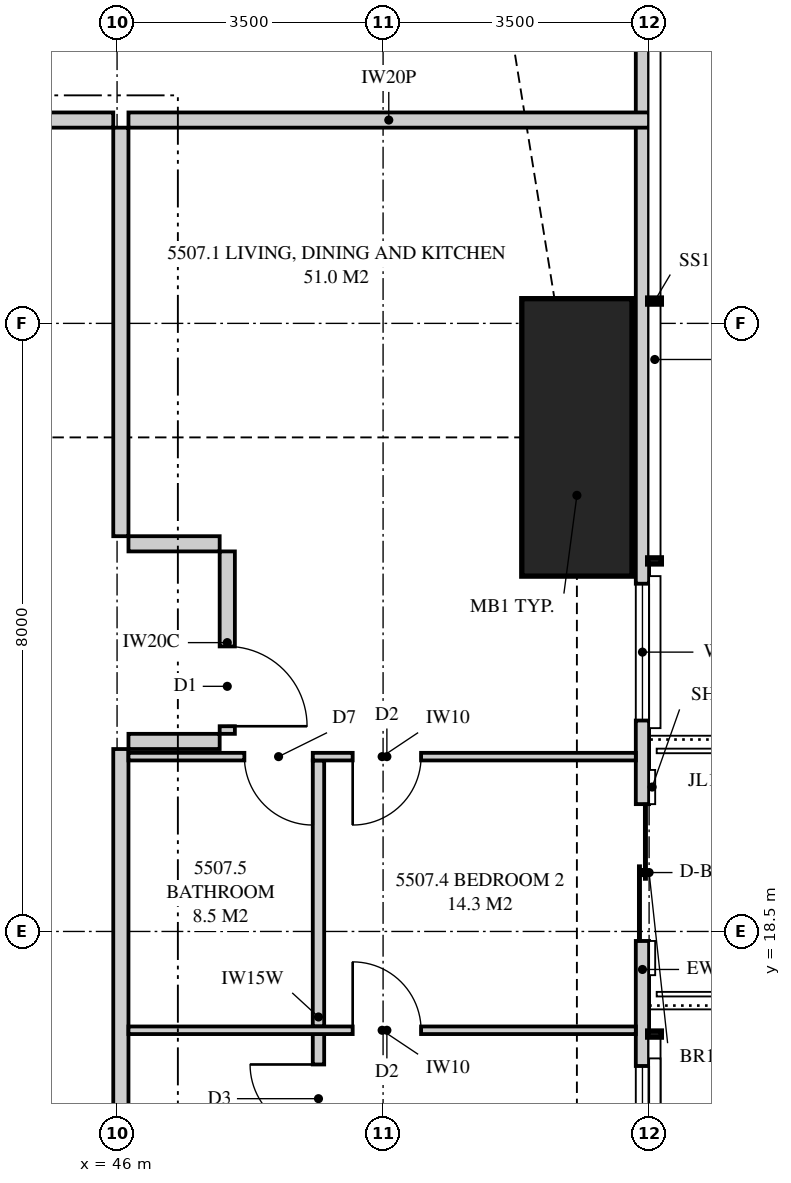
"""IFC4 building model, lengths in metres.
Left out: names, types, materials, properties, quantities, classifications, styles, units other than length and angle.
Written with IfcOpenShell. Run it as: python <this file> out.ifc"""

import sys

from ifc_helpers import new_model, si_unit, direction, frame, frame_2d, origin, origin_2d, place, context, subcontext, project, spatial, polyline, rectangle, outline, extrude, element, fill, save


model = new_model("IFC4")
c1 = context("Model", 3, precision=1e-05, world=origin(), true_north=direction((0.0, 1.0)))
c2 = subcontext(c1, "Body", "Model", "MODEL_VIEW")
j1 = project(units=[si_unit("LENGTHUNIT", "METRE"), si_unit("PLANEANGLEUNIT", "RADIAN")], contexts=[c1])
p1 = place(None, origin())
s1 = spatial("IfcSite", under=j1, at=p1, CompositionType="ELEMENT")
p2 = place(p1, origin())
s2 = spatial("IfcBuilding", under=s1, at=p2, CompositionType="ELEMENT")
p3 = place(p2, frame((0.0, 0.0, 201.25)))
s3 = spatial("IfcBuildingStorey", under=s2, at=p3, CompositionType="ELEMENT", Elevation=201.25)
p4 = place(p3, frame((52.05, 25.0, 0.0), z_axis=(0.0, 0.0, 1.0), x_axis=(1.0, 0.0, 0.0)))
e1 = element("IfcColumn", 1, at=p4, inside=s3, PredefinedType="COLUMN", context=c2, shape_type="SweptSolid", body=[
    extrude(rectangle(XDim=1.45, YDim=3.65, at=origin_2d()), origin(), (0.0, 0.0, 1.0), 3.35),
])
p5 = place(p3, frame((52.913, 3.051, 0.0), z_axis=(0.0, 0.0, 1.0), x_axis=(0.0, 1.0, 0.0)))
e2 = element("IfcWall", 2, at=p5, inside=s3, PredefinedType="SOLIDWALL", context=c2, shape_type="SweptSolid", body=[
    extrude(outline(polyline([(0.0, 0.0), (29.897, 0.0), (29.897, 3.11), (22.167, 3.11), (22.167, 2.15), (22.074, 2.15), (22.074, 3.11), (21.949, 3.11), (21.949, 2.15), (9.949, 2.15), (9.949, 3.11), (9.847, 3.11), (9.847, 2.15), (9.706, 2.15), (9.706, 3.11), (0.0, 3.11), (0.0, 0.0)])), frame((0.0, 0.087, 0.0), z_axis=(0.0, -1.0, 0.0), x_axis=(1.0, 0.0, 0.0)), (0.0, 0.0, 1.0), 0.175),
])
p6 = place(p5, frame((1.137, 0.0, 0.4)))
e3 = element("IfcOpeningElement", 3, at=p6, cuts=e2, PredefinedType="OPENING", context=c2, shape_type="SweptSolid", body=[
    extrude(rectangle(XDim=2.4, YDim=1.7, at=frame_2d((1.2, 0.85))), frame((0.0, 0.097, 0.0), z_axis=(0.0, -1.0, 0.0), x_axis=(1.0, 0.0, 0.0)), (0.0, 0.0, 1.0), 0.195),
])
p7 = place(p5, frame((5.571, 0.0, 0.4)))
e4 = element("IfcOpeningElement", 4, at=p7, cuts=e2, PredefinedType="OPENING", context=c2, shape_type="SweptSolid", body=[
    extrude(rectangle(XDim=2.4, YDim=1.7, at=frame_2d((1.2, 0.85))), frame((0.0, 0.097, 0.0), z_axis=(0.0, -1.0, 0.0), x_axis=(1.0, 0.0, 0.0)), (0.0, 0.0, 1.0), 0.195),
])
p8 = place(p5, frame((11.879, 0.0, 0.4)))
e5 = element("IfcOpeningElement", 5, at=p8, cuts=e2, PredefinedType="OPENING", context=c2, shape_type="SweptSolid", body=[
    extrude(rectangle(XDim=1.8, YDim=1.7, at=frame_2d((0.9, 0.85))), frame((0.0, 0.097, 0.0), z_axis=(0.0, -1.0, 0.0), x_axis=(1.0, 0.0, 0.0)), (0.0, 0.0, 1.0), 0.195),
])
p9 = place(p5, frame((15.324, 0.0, 0.0)))
e6 = element("IfcOpeningElement", 6, at=p9, cuts=e2, PredefinedType="OPENING", context=c2, shape_type="SweptSolid", body=[
    extrude(rectangle(XDim=1.8, YDim=2.1, at=frame_2d((0.9, 1.05))), frame((0.0, 0.097, 0.0), z_axis=(0.0, -1.0, 0.0), x_axis=(1.0, 0.0, 0.0)), (0.0, 0.0, 1.0), 0.195),
])
p10 = place(p5, frame((18.224, 0.0, 0.4)))
e7 = element("IfcOpeningElement", 7, at=p10, cuts=e2, PredefinedType="OPENING", context=c2, shape_type="SweptSolid", body=[
    extrude(rectangle(XDim=1.8, YDim=1.7, at=frame_2d((0.9, 0.85))), frame((0.0, 0.097, 0.0), z_axis=(0.0, -1.0, 0.0), x_axis=(1.0, 0.0, 0.0)), (0.0, 0.0, 1.0), 0.195),
])
p11 = place(p5, frame((27.461, 0.0, 0.4)))
e8 = element("IfcOpeningElement", 8, at=p11, cuts=e2, PredefinedType="OPENING", context=c2, shape_type="SweptSolid", body=[
    extrude(rectangle(XDim=1.2, YDim=1.7, at=frame_2d((0.6, 0.85))), frame((0.0, 0.097, 0.0), z_axis=(0.0, -1.0, 0.0), x_axis=(1.0, 0.0, 0.0)), (0.0, 0.0, 1.0), 0.195),
])
p12 = place(p3, frame((46.15, 29.175, 0.0), z_axis=(0.0, 0.0, 1.0), x_axis=(1.0, 0.0, 0.0)))
e9 = element("IfcWall", 9, at=p12, inside=s3, PredefinedType="PARTITIONING", context=c2, shape_type="SweptSolid", body=[
    extrude(outline(polyline([(0.0, 0.0), (6.85, 0.0), (6.85, 3.11), (6.147, 3.11), (6.147, 2.15), (4.303, 2.15), (4.303, 3.11), (0.0, 3.11), (0.0, 0.0)])), frame((0.0, 0.1, 0.0), z_axis=(0.0, -1.0, 0.0), x_axis=(1.0, 0.0, 0.0)), (0.0, 0.0, 1.0), 0.2),
])
p13 = place(p3, frame((46.05, 14.0, 0.0), z_axis=(0.0, 0.0, 1.0), x_axis=(0.0, 1.0, 0.0)))
e10 = element("IfcWall", 10, at=p13, inside=s3, PredefinedType="PARTITIONING", context=c2, shape_type="SweptSolid", body=[
    extrude(rectangle(XDim=6.9, YDim=0.2, at=frame_2d((3.45, 0.0))), origin(), (0.0, 0.0, 1.0), 3.11),
])
p14 = place(p3, frame((52.825, 17.2, 0.0), z_axis=(0.0, 0.0, 1.0), x_axis=(-1.0, 0.0, 0.0)))
e11 = element("IfcWall", 11, at=p14, inside=s3, PredefinedType="PARTITIONING", context=c2, shape_type="SweptSolid", body=[
    extrude(outline(polyline([(0.0, 0.0), (6.675, 0.0), (6.675, 3.11), (1.635, 3.11), (1.635, 2.15), (0.0, 2.15), (0.0, 3.11), (0.0, 0.0)])), frame((0.0, 0.05, 0.0), z_axis=(0.0, -1.0, 0.0), x_axis=(1.0, 0.0, 0.0)), (0.0, 0.0, 1.0), 0.1),
])
p15 = place(p14, frame((2.825, 0.0, 0.0)))
e12 = element("IfcOpeningElement", 12, at=p15, cuts=e11, PredefinedType="OPENING", context=c2, shape_type="SweptSolid", body=[
    extrude(rectangle(XDim=0.9, YDim=2.1, at=frame_2d((0.45, 1.05))), frame((0.0, 0.06, 0.0), z_axis=(0.0, -1.0, 0.0), x_axis=(1.0, 0.0, 0.0)), (0.0, 0.0, 1.0), 0.12),
])
p16 = place(p3, frame((52.825, 20.8, 0.0), z_axis=(0.0, 0.0, 1.0), x_axis=(-1.0, 0.0, 0.0)))
e13 = element("IfcWall", 13, at=p16, inside=s3, PredefinedType="PARTITIONING", context=c2, shape_type="SweptSolid", body=[
    extrude(outline(polyline([(0.0, 0.0), (6.675, 0.0), (6.675, 3.11), (1.635, 3.11), (1.635, 2.15), (0.0, 2.15), (0.0, 3.11), (0.0, 0.0)])), frame((0.0, 0.05, 0.0), z_axis=(0.0, -1.0, 0.0), x_axis=(1.0, 0.0, 0.0)), (0.0, 0.0, 1.0), 0.1),
])
p17 = place(p16, frame((2.825, 0.0, 0.0)))
e14 = element("IfcOpeningElement", 14, at=p17, cuts=e13, PredefinedType="OPENING", context=c2, shape_type="SweptSolid", body=[
    extrude(rectangle(XDim=0.9, YDim=2.1, at=frame_2d((0.45, 1.05))), frame((0.0, 0.06, 0.0), z_axis=(0.0, -1.0, 0.0), x_axis=(1.0, 0.0, 0.0)), (0.0, 0.0, 1.0), 0.12),
])
p18 = place(p16, frame((4.25, 0.0, 0.0)))
e15 = element("IfcOpeningElement", 15, at=p18, cuts=e13, PredefinedType="OPENING", context=c2, shape_type="SweptSolid", body=[
    extrude(rectangle(XDim=0.9, YDim=2.1, at=frame_2d((0.45, 1.05))), frame((0.0, 0.06, 0.0), z_axis=(0.0, -1.0, 0.0), x_axis=(1.0, 0.0, 0.0)), (0.0, 0.0, 1.0), 0.12),
])
p19 = place(p3, frame((48.65, 14.0, 0.0), z_axis=(0.0, 0.0, 1.0), x_axis=(0.0, 1.0, 0.0)))
e16 = element("IfcWall", 16, at=p19, inside=s3, PredefinedType="PLUMBINGWALL", context=c2, shape_type="SweptSolid", body=[
    extrude(rectangle(XDim=3.15, YDim=0.15, at=frame_2d((1.575, 0.0))), origin(), (0.0, 0.0, 1.0), 3.11),
])
p20 = place(p19, frame((1.85, 0.0, 0.0)))
e17 = element("IfcOpeningElement", 17, at=p20, cuts=e16, PredefinedType="OPENING", context=c2, shape_type="SweptSolid", body=[
    extrude(rectangle(XDim=0.9, YDim=2.1, at=frame_2d((0.45, 1.05))), frame((0.0, 0.085, 0.0), z_axis=(0.0, -1.0, 0.0), x_axis=(1.0, 0.0, 0.0)), (0.0, 0.0, 1.0), 0.17),
])
p21 = place(p3, frame((48.65, 17.25, 0.0), z_axis=(0.0, 0.0, 1.0), x_axis=(0.0, 1.0, 0.0)))
e18 = element("IfcWall", 18, at=p21, inside=s3, PredefinedType="PLUMBINGWALL", context=c2, shape_type="SweptSolid", body=[
    extrude(rectangle(XDim=3.5, YDim=0.15, at=frame_2d((1.75, 0.0))), origin(), (0.0, 0.0, 1.0), 3.11),
])
p22 = place(p3, frame((46.05, 23.7, 0.0), z_axis=(0.0, 0.0, 1.0), x_axis=(0.0, 1.0, 0.0)))
e19 = element("IfcWall", 19, at=p22, inside=s3, PredefinedType="PARTITIONING", context=c2, shape_type="SweptSolid", body=[
    extrude(outline(polyline([(0.0, 0.0), (5.375, 0.0), (5.375, 3.11), (1.637, 3.11), (1.637, 2.541), (0.963, 2.541), (0.963, 3.11), (0.0, 3.11), (0.0, 0.0)])), frame((0.0, 0.1, 0.0), z_axis=(0.0, -1.0, 0.0), x_axis=(1.0, 0.0, 0.0)), (0.0, 0.0, 1.0), 0.2),
])
p23 = place(p3, frame((47.45, 21.1, 0.0), z_axis=(0.0, 0.0, 1.0), x_axis=(0.0, 1.0, 0.0)))
e20 = element("IfcWall", 20, at=p23, inside=s3, PredefinedType="PARTITIONING", context=c2, shape_type="SweptSolid", body=[
    extrude(rectangle(XDim=2.4, YDim=0.2, at=frame_2d((1.2, 0.0))), origin(), (0.0, 0.0, 1.0), 3.11),
])
p24 = place(p23, frame((0.1, 0.0, 0.0)))
e21 = element("IfcOpeningElement", 21, at=p24, cuts=e20, PredefinedType="OPENING", context=c2, shape_type="SweptSolid", body=[
    extrude(rectangle(XDim=1.05, YDim=2.2, at=frame_2d((0.525, 1.1))), frame((0.0, 0.11, 0.0), z_axis=(0.0, -1.0, 0.0), x_axis=(1.0, 0.0, 0.0)), (0.0, 0.0, 1.0), 0.22),
])
for number, where, z_axis, x_axis in (
    (22, (46.15, 21.0, 0.0), (0.0, 0.0, 1.0), (1.0, 0.0, 0.0)),
    (23, (46.15, 23.6, 0.0), (0.0, 0.0, 1.0), (1.0, 0.0, 0.0)),
):
    element("IfcWall", number, at=place(p3, frame(where, z_axis=z_axis, x_axis=x_axis)), inside=s3, PredefinedType="PARTITIONING", context=c2, shape_type="SweptSolid", body=[
        extrude(rectangle(XDim=1.2, YDim=0.2, at=frame_2d((0.6, 0.0))), origin(), (0.0, 0.0, 1.0), 3.11),
    ])
p25 = place(p3, frame((42.325, 29.175, 0.0), z_axis=(0.0, 0.0, 1.0), x_axis=(1.0, 0.0, 0.0)))
e24 = element("IfcWall", 24, at=p25, inside=s3, PredefinedType="PARTITIONING", context=c2, shape_type="SweptSolid", body=[
    extrude(outline(polyline([(0.0, 0.0), (3.625, 0.0), (3.625, 3.11), (0.762, 3.11), (0.762, 2.541), (0.088, 2.541), (0.088, 3.11), (0.0, 3.11), (0.0, 0.0)])), frame((0.0, 0.1, 0.0), z_axis=(0.0, -1.0, 0.0), x_axis=(1.0, 0.0, 0.0)), (0.0, 0.0, 1.0), 0.2),
])
p26 = place(p8, origin())
e25 = element("IfcWindow", 25, at=p26, inside=s3, PartitioningType="SINGLE_PANEL", PredefinedType="WINDOW", context=c2, shape_type="SweptSolid", body=[
    extrude(rectangle(XDim=1.8, YDim=1.7, at=frame_2d((0.9, 0.85))), frame((0.0, 0.03, 0.0), z_axis=(0.0, -1.0, 0.0), x_axis=(1.0, 0.0, 0.0)), (0.0, 0.0, 1.0), 0.06),
])
fill(e5, e25)
p27 = place(p9, origin())
e26 = element("IfcDoor", 26, at=p27, inside=s3, OperationType="SLIDING_TO_LEFT", PredefinedType="DOOR", context=c2, shape_type="SweptSolid", body=[
    extrude(rectangle(XDim=1.8, YDim=2.1, at=frame_2d((0.9, 1.05))), frame((0.0, 0.025, 0.0), z_axis=(0.0, -1.0, 0.0), x_axis=(1.0, 0.0, 0.0)), (0.0, 0.0, 1.0), 0.05),
])
fill(e6, e26)
p28 = place(p10, origin())
e27 = element("IfcWindow", 27, at=p28, inside=s3, PartitioningType="SINGLE_PANEL", PredefinedType="WINDOW", context=c2, shape_type="SweptSolid", body=[
    extrude(rectangle(XDim=1.8, YDim=1.7, at=frame_2d((0.9, 0.85))), frame((0.0, 0.03, 0.0), z_axis=(0.0, -1.0, 0.0), x_axis=(1.0, 0.0, 0.0)), (0.0, 0.0, 1.0), 0.06),
])
fill(e7, e27)
p29 = place(p24, frame((1.05, 0.0, 0.0), z_axis=(0.0, 0.0, 1.0), x_axis=(-1.0, 0.0, 0.0)))
e28 = element("IfcDoor", 28, at=p29, inside=s3, OperationType="SINGLE_SWING_RIGHT", PredefinedType="DOOR", context=c2, shape_type="SweptSolid", body=[
    extrude(rectangle(XDim=1.05, YDim=2.2, at=frame_2d((0.525, 1.1))), frame((0.0, 0.025, 0.0), z_axis=(0.0, -1.0, 0.0), x_axis=(1.0, 0.0, 0.0)), (0.0, 0.0, 1.0), 0.05),
])
fill(e21, e28)
p30 = place(p15, frame((0.9, 0.0, 0.0), z_axis=(0.0, 0.0, 1.0), x_axis=(-1.0, 0.0, 0.0)))
e29 = element("IfcDoor", 29, at=p30, inside=s3, OperationType="SINGLE_SWING_LEFT", PredefinedType="DOOR", context=c2, shape_type="SweptSolid", body=[
    extrude(rectangle(XDim=0.9, YDim=2.1, at=frame_2d((0.45, 1.05))), frame((0.0, 0.025, 0.0), z_axis=(0.0, -1.0, 0.0), x_axis=(1.0, 0.0, 0.0)), (0.0, 0.0, 1.0), 0.05),
])
fill(e12, e29)
p31 = place(p20, origin())
e30 = element("IfcDoor", 30, at=p31, inside=s3, OperationType="SINGLE_SWING_RIGHT", PredefinedType="DOOR", context=c2, shape_type="SweptSolid", body=[
    extrude(rectangle(XDim=0.9, YDim=2.1, at=frame_2d((0.45, 1.05))), frame((0.0, 0.025, 0.0), z_axis=(0.0, -1.0, 0.0), x_axis=(1.0, 0.0, 0.0)), (0.0, 0.0, 1.0), 0.05),
])
fill(e17, e30)
p32 = place(p17, origin())
e31 = element("IfcDoor", 31, at=p32, inside=s3, OperationType="SINGLE_SWING_RIGHT", PredefinedType="DOOR", context=c2, shape_type="SweptSolid", body=[
    extrude(rectangle(XDim=0.9, YDim=2.1, at=frame_2d((0.45, 1.05))), frame((0.0, 0.025, 0.0), z_axis=(0.0, -1.0, 0.0), x_axis=(1.0, 0.0, 0.0)), (0.0, 0.0, 1.0), 0.05),
])
fill(e14, e31)
p33 = place(p18, origin())
e32 = element("IfcDoor", 32, at=p33, inside=s3, OperationType="SINGLE_SWING_LEFT", PredefinedType="DOOR", context=c2, shape_type="SweptSolid", body=[
    extrude(rectangle(XDim=0.9, YDim=2.1, at=frame_2d((0.45, 1.05))), frame((0.0, 0.025, 0.0), z_axis=(0.0, -1.0, 0.0), x_axis=(1.0, 0.0, 0.0)), (0.0, 0.0, 1.0), 0.05),
])
fill(e15, e32)
save(model, sys.argv[1])
